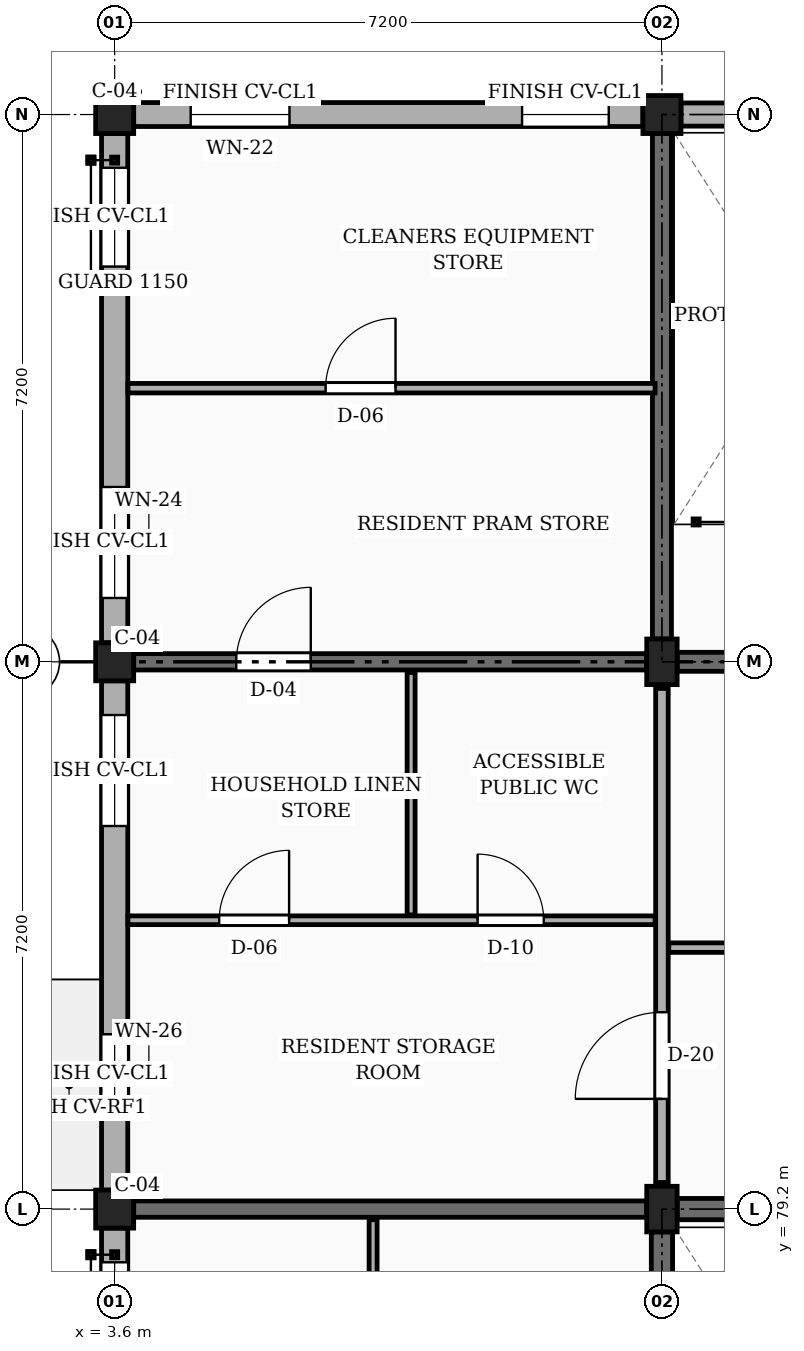
"""IFC4 building model, lengths in metres.
Left out: names, types, materials, properties, quantities, classifications, styles, units other than length and angle.
Written with IfcOpenShell. Run it as: python <this file> out.ifc"""

import sys

from ifc_helpers import new_model, si_unit, direction, frame, frame_2d, origin, origin_2d, place, context, subcontext, project, spatial, rectangle, extrude, element, fill, save


model = new_model("IFC4")
c1 = context("Model", 3, precision=1e-05, world=origin(), true_north=direction((0.0, 1.0)))
c2 = subcontext(c1, "Body", "Model", "MODEL_VIEW")
j1 = project(units=[si_unit("LENGTHUNIT", "METRE"), si_unit("PLANEANGLEUNIT", "RADIAN")], contexts=[c1])
p1 = place(None, origin())
s1 = spatial("IfcSite", under=j1, at=p1, CompositionType="ELEMENT")
p2 = place(p1, origin())
s2 = spatial("IfcBuilding", under=s1, at=p2, CompositionType="ELEMENT")
p3 = place(p2, frame((0.0, 0.0, 26.55)))
s3 = spatial("IfcBuildingStorey", under=s2, at=p3, CompositionType="ELEMENT", Elevation=26.55)
for number, where, z_axis, x_axis in (
    (1, (3.6, 79.2, 0.0), (0.0, 0.0, 1.0), (1.0, 0.0, 0.0)),
    (2, (3.6, 86.4, 0.0), (0.0, 0.0, 1.0), (1.0, 0.0, 0.0)),
    (3, (3.6, 93.6, 0.0), (0.0, 0.0, 1.0), (1.0, 0.0, 0.0)),
):
    element("IfcColumn", number, at=place(p3, frame(where, z_axis=z_axis, x_axis=x_axis)), inside=s3, PredefinedType="COLUMN", context=c2, shape_type="SweptSolid", body=[
        extrude(rectangle(XDim=0.5, YDim=0.5, at=origin_2d()), origin(), (0.0, 0.0, 1.0), 3.15),
    ])
for number, where, z_axis, x_axis in (
    (4, (10.8, 79.2, 0.0), (0.0, 0.0, 1.0), (1.0, 0.0, 0.0)),
    (5, (10.8, 86.4, 0.0), (0.0, 0.0, 1.0), (1.0, 0.0, 0.0)),
):
    element("IfcColumn", number, at=place(p3, frame(where, z_axis=z_axis, x_axis=x_axis)), inside=s3, PredefinedType="COLUMN", context=c2, shape_type="SweptSolid", body=[
        extrude(rectangle(XDim=0.4, YDim=0.6, at=origin_2d()), origin(), (0.0, 0.0, 1.0), 3.15),
    ])
p4 = place(p3, frame((10.8, 93.6, 0.0), z_axis=(0.0, 0.0, 1.0), x_axis=(1.0, 0.0, 0.0)))
e6 = element("IfcColumn", 6, at=p4, inside=s3, PredefinedType="COLUMN", context=c2, shape_type="SweptSolid", body=[
    extrude(rectangle(XDim=0.5, YDim=0.5, at=origin_2d()), origin(), (0.0, 0.0, 1.0), 3.15),
])
p5 = place(p3, frame((3.85, 79.2, 0.0), z_axis=(0.0, 0.0, 1.0), x_axis=(1.0, 0.0, 0.0)))
e7 = element("IfcWall", 7, at=p5, inside=s3, PredefinedType="SOLIDWALL", context=c2, shape_type="SweptSolid", body=[
    extrude(rectangle(XDim=6.75, YDim=0.215, at=frame_2d((3.375, 0.0))), origin(), (0.0, 0.0, 1.0), 2.22),
])
p6 = place(p3, frame((3.85, 86.4, 0.0), z_axis=(0.0, 0.0, 1.0), x_axis=(1.0, 0.0, 0.0)))
e8 = element("IfcWall", 8, at=p6, inside=s3, PredefinedType="SOLIDWALL", context=c2, shape_type="SweptSolid", body=[
    extrude(rectangle(XDim=6.75, YDim=0.215, at=frame_2d((3.375, 0.0))), origin(), (0.0, 0.0, 1.0), 2.22),
])
p7 = place(p6, frame((1.35, 0.0, 0.0)))
e9 = element("IfcOpeningElement", 9, at=p7, cuts=e8, PredefinedType="OPENING", context=c2, shape_type="SweptSolid", body=[
    extrude(rectangle(XDim=0.98, YDim=2.12, at=frame_2d((0.49, 1.06))), frame((0.0, 0.118, 0.0), z_axis=(0.0, -1.0, 0.0), x_axis=(1.0, 0.0, 0.0)), (0.0, 0.0, 1.0), 0.235),
])
p8 = place(p3, frame((17.75, 93.6, 0.0), z_axis=(0.0, 0.0, 1.0), x_axis=(-1.0, 0.0, 0.0)))
e10 = element("IfcWall", 10, at=p8, inside=s3, PredefinedType="SOLIDWALL", context=c2, shape_type="SweptSolid", body=[
    extrude(rectangle(XDim=6.7, YDim=0.305, at=frame_2d((3.35, 0.0))), origin(), (0.0, 0.0, 1.0), 2.46),
])
p9 = place(p8, frame((2.925, 0.0, 0.9)))
e11 = element("IfcOpeningElement", 11, at=p9, cuts=e10, PredefinedType="OPENING", context=c2, shape_type="SweptSolid", body=[
    extrude(rectangle(XDim=0.85, YDim=1.15, at=frame_2d((0.425, 0.575))), frame((0.0, 0.163, 0.0), z_axis=(0.0, -1.0, 0.0), x_axis=(1.0, 0.0, 0.0)), (0.0, 0.0, 1.0), 0.325),
])
p10 = place(p3, frame((10.55, 93.6, 0.0), z_axis=(0.0, 0.0, 1.0), x_axis=(-1.0, 0.0, 0.0)))
e12 = element("IfcWall", 12, at=p10, inside=s3, PredefinedType="SOLIDWALL", context=c2, shape_type="SweptSolid", body=[
    extrude(rectangle(XDim=6.7, YDim=0.315, at=frame_2d((3.35, 0.0))), origin(), (0.0, 0.0, 1.0), 2.46),
])
p11 = place(p10, frame((0.45, 0.0, 0.78)))
e13 = element("IfcOpeningElement", 13, at=p11, cuts=e12, PredefinedType="OPENING", context=c2, shape_type="SweptSolid", body=[
    extrude(rectangle(XDim=1.14, YDim=1.36, at=frame_2d((0.57, 0.68))), frame((0.0, 0.167, 0.0), z_axis=(0.0, -1.0, 0.0), x_axis=(1.0, 0.0, 0.0)), (0.0, 0.0, 1.0), 0.335),
])
p12 = place(p10, frame((4.65, 0.0, 0.78)))
e14 = element("IfcOpeningElement", 14, at=p12, cuts=e12, PredefinedType="OPENING", context=c2, shape_type="SweptSolid", body=[
    extrude(rectangle(XDim=1.3, YDim=1.36, at=frame_2d((0.65, 0.68))), frame((0.0, 0.167, 0.0), z_axis=(0.0, -1.0, 0.0), x_axis=(1.0, 0.0, 0.0)), (0.0, 0.0, 1.0), 0.335),
])
p13 = place(p3, frame((3.6, 93.35, 0.0), z_axis=(0.0, 0.0, 1.0), x_axis=(0.0, -1.0, 0.0)))
e15 = element("IfcWall", 15, at=p13, inside=s3, PredefinedType="SOLIDWALL", context=c2, shape_type="SweptSolid", body=[
    extrude(rectangle(XDim=6.7, YDim=0.345, at=frame_2d((3.35, 0.0))), origin(), (0.0, 0.0, 1.0), 2.46),
])
p14 = place(p13, frame((0.45, 0.0, 0.78)))
e16 = element("IfcOpeningElement", 16, at=p14, cuts=e15, PredefinedType="OPENING", context=c2, shape_type="SweptSolid", body=[
    extrude(rectangle(XDim=1.3, YDim=1.36, at=frame_2d((0.65, 0.68))), frame((0.0, 0.183, 0.0), z_axis=(0.0, -1.0, 0.0), x_axis=(1.0, 0.0, 0.0)), (0.0, 0.0, 1.0), 0.365),
])
p15 = place(p13, frame((4.65, 0.0, 0.78)))
e17 = element("IfcOpeningElement", 17, at=p15, cuts=e15, PredefinedType="OPENING", context=c2, shape_type="SweptSolid", body=[
    extrude(rectangle(XDim=1.46, YDim=1.36, at=frame_2d((0.73, 0.68))), frame((0.0, 0.183, 0.0), z_axis=(0.0, -1.0, 0.0), x_axis=(1.0, 0.0, 0.0)), (0.0, 0.0, 1.0), 0.365),
])
p16 = place(p3, frame((3.6, 86.15, 0.0), z_axis=(0.0, 0.0, 1.0), x_axis=(0.0, -1.0, 0.0)))
e18 = element("IfcWall", 18, at=p16, inside=s3, PredefinedType="SOLIDWALL", context=c2, shape_type="SweptSolid", body=[
    extrude(rectangle(XDim=6.7, YDim=0.345, at=frame_2d((3.35, 0.0))), origin(), (0.0, 0.0, 1.0), 2.46),
])
p17 = place(p16, frame((0.45, 0.0, 0.78)))
e19 = element("IfcOpeningElement", 19, at=p17, cuts=e18, PredefinedType="OPENING", context=c2, shape_type="SweptSolid", body=[
    extrude(rectangle(XDim=1.46, YDim=1.36, at=frame_2d((0.73, 0.68))), frame((0.0, 0.183, 0.0), z_axis=(0.0, -1.0, 0.0), x_axis=(1.0, 0.0, 0.0)), (0.0, 0.0, 1.0), 0.365),
])
p18 = place(p16, frame((4.65, 0.0, 0.78)))
e20 = element("IfcOpeningElement", 20, at=p18, cuts=e18, PredefinedType="OPENING", context=c2, shape_type="SweptSolid", body=[
    extrude(rectangle(XDim=1.05, YDim=1.44, at=frame_2d((0.525, 0.72))), frame((0.0, 0.183, 0.0), z_axis=(0.0, -1.0, 0.0), x_axis=(1.0, 0.0, 0.0)), (0.0, 0.0, 1.0), 0.365),
])
p19 = place(p3, frame((3.6, 78.95, 0.0), z_axis=(0.0, 0.0, 1.0), x_axis=(0.0, -1.0, 0.0)))
e21 = element("IfcWall", 21, at=p19, inside=s3, PredefinedType="SOLIDWALL", context=c2, shape_type="SweptSolid", body=[
    extrude(rectangle(XDim=6.7, YDim=0.345, at=frame_2d((3.35, 0.0))), origin(), (0.0, 0.0, 1.0), 2.46),
])
p20 = place(p19, frame((0.45, 0.0, 0.78)))
e22 = element("IfcOpeningElement", 22, at=p20, cuts=e21, PredefinedType="OPENING", context=c2, shape_type="SweptSolid", body=[
    extrude(rectangle(XDim=1.05, YDim=1.44, at=frame_2d((0.525, 0.72))), frame((0.0, 0.183, 0.0), z_axis=(0.0, -1.0, 0.0), x_axis=(1.0, 0.0, 0.0)), (0.0, 0.0, 1.0), 0.365),
])
p21 = place(p19, frame((4.65, 0.0, 0.78)))
e23 = element("IfcOpeningElement", 23, at=p21, cuts=e21, PredefinedType="OPENING", context=c2, shape_type="SweptSolid", body=[
    extrude(rectangle(XDim=1.25, YDim=1.44, at=frame_2d((0.625, 0.72))), frame((0.0, 0.183, 0.0), z_axis=(0.0, -1.0, 0.0), x_axis=(1.0, 0.0, 0.0)), (0.0, 0.0, 1.0), 0.365),
])
p22 = place(p3, frame((10.8, 72.3, 0.0), z_axis=(0.0, 0.0, 1.0), x_axis=(0.0, 1.0, 0.0)))
e24 = element("IfcWall", 24, at=p22, inside=s3, PredefinedType="SHEAR", context=c2, shape_type="SweptSolid", body=[
    extrude(rectangle(XDim=6.6, YDim=0.28, at=frame_2d((3.3, 0.0))), origin(), (0.0, 0.0, 1.0), 2.89),
])
p23 = place(p3, frame((11.0, 79.2, 0.0), z_axis=(0.0, 0.0, 1.0), x_axis=(1.0, 0.0, 0.0)))
e25 = element("IfcWall", 25, at=p23, inside=s3, PredefinedType="SHEAR", context=c2, shape_type="SweptSolid", body=[
    extrude(rectangle(XDim=6.8, YDim=0.28, at=frame_2d((3.4, 0.0))), origin(), (0.0, 0.0, 1.0), 2.89),
])
p24 = place(p3, frame((10.8, 86.7, 0.0), z_axis=(0.0, 0.0, 1.0), x_axis=(0.0, 1.0, 0.0)))
e26 = element("IfcWall", 26, at=p24, inside=s3, PredefinedType="SHEAR", context=c2, shape_type="SweptSolid", body=[
    extrude(rectangle(XDim=6.65, YDim=0.25, at=frame_2d((3.325, 0.0))), origin(), (0.0, 0.0, 1.0), 2.89),
])
p25 = place(p3, frame((11.0, 86.4, 0.0), z_axis=(0.0, 0.0, 1.0), x_axis=(1.0, 0.0, 0.0)))
e27 = element("IfcWall", 27, at=p25, inside=s3, PredefinedType="SHEAR", context=c2, shape_type="SweptSolid", body=[
    extrude(rectangle(XDim=6.8, YDim=0.25, at=frame_2d((3.4, 0.0))), origin(), (0.0, 0.0, 1.0), 2.89),
])
p26 = place(p3, frame((10.8, 79.55, 0.0), z_axis=(0.0, 0.0, 1.0), x_axis=(0.0, 1.0, 0.0)))
e28 = element("IfcWall", 28, at=p26, inside=s3, PredefinedType="PARTITIONING", context=c2, shape_type="SweptSolid", body=[
    extrude(rectangle(XDim=6.5, YDim=0.165, at=frame_2d((3.25, 0.0))), origin(), (0.0, 0.0, 1.0), 2.325),
])
p27 = place(p26, frame((1.1, 0.0, 0.0)))
e29 = element("IfcOpeningElement", 29, at=p27, cuts=e28, PredefinedType="OPENING", context=c2, shape_type="SweptSolid", body=[
    extrude(rectangle(XDim=1.14, YDim=2.18, at=frame_2d((0.57, 1.09))), frame((0.0, 0.093, 0.0), z_axis=(0.0, -1.0, 0.0), x_axis=(1.0, 0.0, 0.0)), (0.0, 0.0, 1.0), 0.185),
])
p28 = place(p3, frame((7.0, 75.37, 0.0), z_axis=(0.0, 0.0, 1.0), x_axis=(0.0, 1.0, 0.0)))
e30 = element("IfcWall", 30, at=p28, inside=s3, PredefinedType="PARTITIONING", context=c2, shape_type="SweptSolid", body=[
    extrude(rectangle(XDim=3.69, YDim=0.105, at=frame_2d((1.845, 0.0))), origin(), (0.0, 0.0, 1.0), 2.325),
])
p29 = place(p3, frame((10.89, 82.64, 0.0), z_axis=(0.0, 0.0, 1.0), x_axis=(1.0, 0.0, 0.0)))
e31 = element("IfcWall", 31, at=p29, inside=s3, PredefinedType="PARTITIONING", context=c2, shape_type="SweptSolid", body=[
    extrude(rectangle(XDim=7.02, YDim=0.125, at=frame_2d((3.51, 0.0))), origin(), (0.0, 0.0, 1.0), 2.325),
])
p30 = place(p29, frame((2.85, 0.0, 0.0)))
e32 = element("IfcOpeningElement", 32, at=p30, cuts=e31, PredefinedType="OPENING", context=c2, shape_type="SweptSolid", body=[
    extrude(rectangle(XDim=1.02, YDim=2.15, at=frame_2d((0.51, 1.075))), frame((0.0, 0.073, 0.0), z_axis=(0.0, -1.0, 0.0), x_axis=(1.0, 0.0, 0.0)), (0.0, 0.0, 1.0), 0.145),
])
p31 = place(p3, frame((3.775, 83.0, 0.0), z_axis=(0.0, 0.0, 1.0), x_axis=(1.0, 0.0, 0.0)))
e33 = element("IfcWall", 33, at=p31, inside=s3, PredefinedType="PARTITIONING", context=c2, shape_type="SweptSolid", body=[
    extrude(rectangle(XDim=6.935, YDim=0.115, at=frame_2d((3.468, 0.0))), origin(), (0.0, 0.0, 1.0), 2.325),
])
p32 = place(p31, frame((4.6, 0.0, 0.0)))
e34 = element("IfcOpeningElement", 34, at=p32, cuts=e33, PredefinedType="OPENING", context=c2, shape_type="SweptSolid", body=[
    extrude(rectangle(XDim=0.87, YDim=2.05, at=frame_2d((0.435, 1.025))), frame((0.0, 0.067, 0.0), z_axis=(0.0, -1.0, 0.0), x_axis=(1.0, 0.0, 0.0)), (0.0, 0.0, 1.0), 0.135),
])
p33 = place(p31, frame((1.2, 0.0, 0.0)))
e35 = element("IfcOpeningElement", 35, at=p33, cuts=e33, PredefinedType="OPENING", context=c2, shape_type="SweptSolid", body=[
    extrude(rectangle(XDim=0.92, YDim=2.1, at=frame_2d((0.46, 1.05))), frame((0.0, 0.067, 0.0), z_axis=(0.0, -1.0, 0.0), x_axis=(1.0, 0.0, 0.0)), (0.0, 0.0, 1.0), 0.135),
])
p34 = place(p3, frame((7.5, 83.07, 0.0), z_axis=(0.0, 0.0, 1.0), x_axis=(0.0, 1.0, 0.0)))
e36 = element("IfcWall", 36, at=p34, inside=s3, PredefinedType="PARTITIONING", context=c2, shape_type="SweptSolid", body=[
    extrude(rectangle(XDim=3.19, YDim=0.105, at=frame_2d((1.595, 0.0))), origin(), (0.0, 0.0, 1.0), 2.325),
])
p35 = place(p3, frame((3.775, 90.0, 0.0), z_axis=(0.0, 0.0, 1.0), x_axis=(1.0, 0.0, 0.0)))
e37 = element("IfcWall", 37, at=p35, inside=s3, PredefinedType="PARTITIONING", context=c2, shape_type="SweptSolid", body=[
    extrude(rectangle(XDim=6.935, YDim=0.125, at=frame_2d((3.468, 0.0))), origin(), (0.0, 0.0, 1.0), 2.325),
])
p36 = place(p35, frame((2.6, 0.0, 0.0)))
e38 = element("IfcOpeningElement", 38, at=p36, cuts=e37, PredefinedType="OPENING", context=c2, shape_type="SweptSolid", body=[
    extrude(rectangle(XDim=0.92, YDim=2.1, at=frame_2d((0.46, 1.05))), frame((0.0, 0.073, 0.0), z_axis=(0.0, -1.0, 0.0), x_axis=(1.0, 0.0, 0.0)), (0.0, 0.0, 1.0), 0.145),
])
p37 = place(p11, origin())
e39 = element("IfcWindow", 39, at=p37, inside=s3, PartitioningType="SINGLE_PANEL", PredefinedType="WINDOW", context=c2, shape_type="SweptSolid", body=[
    extrude(rectangle(XDim=1.14, YDim=1.36, at=frame_2d((0.57, 0.68))), frame((0.0, 0.03, 0.0), z_axis=(0.0, -1.0, 0.0), x_axis=(1.0, 0.0, 0.0)), (0.0, 0.0, 1.0), 0.06),
])
fill(e13, e39)
p38 = place(p12, origin())
e40 = element("IfcWindow", 40, at=p38, inside=s3, PartitioningType="SINGLE_PANEL", PredefinedType="WINDOW", context=c2, shape_type="SweptSolid", body=[
    extrude(rectangle(XDim=1.3, YDim=1.36, at=frame_2d((0.65, 0.68))), frame((0.0, 0.03, 0.0), z_axis=(0.0, -1.0, 0.0), x_axis=(1.0, 0.0, 0.0)), (0.0, 0.0, 1.0), 0.06),
])
fill(e14, e40)
p39 = place(p14, origin())
e41 = element("IfcWindow", 41, at=p39, inside=s3, PartitioningType="SINGLE_PANEL", PredefinedType="WINDOW", context=c2, shape_type="SweptSolid", body=[
    extrude(rectangle(XDim=1.3, YDim=1.36, at=frame_2d((0.65, 0.68))), frame((0.0, 0.03, 0.0), z_axis=(0.0, -1.0, 0.0), x_axis=(1.0, 0.0, 0.0)), (0.0, 0.0, 1.0), 0.06),
])
fill(e16, e41)
p40 = place(p15, origin())
e42 = element("IfcWindow", 42, at=p40, inside=s3, PartitioningType="SINGLE_PANEL", PredefinedType="WINDOW", context=c2, shape_type="SweptSolid", body=[
    extrude(rectangle(XDim=1.46, YDim=1.36, at=frame_2d((0.73, 0.68))), frame((0.0, 0.03, 0.0), z_axis=(0.0, -1.0, 0.0), x_axis=(1.0, 0.0, 0.0)), (0.0, 0.0, 1.0), 0.06),
])
fill(e17, e42)
p41 = place(p17, origin())
e43 = element("IfcWindow", 43, at=p41, inside=s3, PartitioningType="SINGLE_PANEL", PredefinedType="WINDOW", context=c2, shape_type="SweptSolid", body=[
    extrude(rectangle(XDim=1.46, YDim=1.36, at=frame_2d((0.73, 0.68))), frame((0.0, 0.03, 0.0), z_axis=(0.0, -1.0, 0.0), x_axis=(1.0, 0.0, 0.0)), (0.0, 0.0, 1.0), 0.06),
])
fill(e19, e43)
p42 = place(p18, origin())
e44 = element("IfcWindow", 44, at=p42, inside=s3, PartitioningType="SINGLE_PANEL", PredefinedType="WINDOW", context=c2, shape_type="SweptSolid", body=[
    extrude(rectangle(XDim=1.05, YDim=1.44, at=frame_2d((0.525, 0.72))), frame((0.0, 0.03, 0.0), z_axis=(0.0, -1.0, 0.0), x_axis=(1.0, 0.0, 0.0)), (0.0, 0.0, 1.0), 0.06),
])
fill(e20, e44)
p43 = place(p20, origin())
e45 = element("IfcWindow", 45, at=p43, inside=s3, PartitioningType="SINGLE_PANEL", PredefinedType="WINDOW", context=c2, shape_type="SweptSolid", body=[
    extrude(rectangle(XDim=1.05, YDim=1.44, at=frame_2d((0.525, 0.72))), frame((0.0, 0.03, 0.0), z_axis=(0.0, -1.0, 0.0), x_axis=(1.0, 0.0, 0.0)), (0.0, 0.0, 1.0), 0.06),
])
fill(e22, e45)
p44 = place(p27, origin())
e46 = element("IfcDoor", 46, at=p44, inside=s3, OperationType="SINGLE_SWING_LEFT", PredefinedType="DOOR", context=c2, shape_type="SweptSolid", body=[
    extrude(rectangle(XDim=1.14, YDim=2.18, at=frame_2d((0.57, 1.09))), frame((0.0, 0.025, 0.0), z_axis=(0.0, -1.0, 0.0), x_axis=(1.0, 0.0, 0.0)), (0.0, 0.0, 1.0), 0.05),
])
fill(e29, e46)
p45 = place(p32, origin())
e47 = element("IfcDoor", 47, at=p45, inside=s3, OperationType="SINGLE_SWING_LEFT", PredefinedType="DOOR", context=c2, shape_type="SweptSolid", body=[
    extrude(rectangle(XDim=0.87, YDim=2.05, at=frame_2d((0.435, 1.025))), frame((0.0, 0.025, 0.0), z_axis=(0.0, -1.0, 0.0), x_axis=(1.0, 0.0, 0.0)), (0.0, 0.0, 1.0), 0.05),
])
fill(e34, e47)
p46 = place(p33, origin())
e48 = element("IfcDoor", 48, at=p46, inside=s3, OperationType="SINGLE_SWING_RIGHT", PredefinedType="DOOR", context=c2, shape_type="SweptSolid", body=[
    extrude(rectangle(XDim=0.92, YDim=2.1, at=frame_2d((0.46, 1.05))), frame((0.0, 0.025, 0.0), z_axis=(0.0, -1.0, 0.0), x_axis=(1.0, 0.0, 0.0)), (0.0, 0.0, 1.0), 0.05),
])
fill(e35, e48)
p47 = place(p36, origin())
e49 = element("IfcDoor", 49, at=p47, inside=s3, OperationType="SINGLE_SWING_RIGHT", PredefinedType="DOOR", context=c2, shape_type="SweptSolid", body=[
    extrude(rectangle(XDim=0.92, YDim=2.1, at=frame_2d((0.46, 1.05))), frame((0.0, 0.025, 0.0), z_axis=(0.0, -1.0, 0.0), x_axis=(1.0, 0.0, 0.0)), (0.0, 0.0, 1.0), 0.05),
])
fill(e38, e49)
p48 = place(p7, origin())
e50 = element("IfcDoor", 50, at=p48, inside=s3, OperationType="SINGLE_SWING_RIGHT", PredefinedType="DOOR", context=c2, shape_type="SweptSolid", body=[
    extrude(rectangle(XDim=0.98, YDim=2.12, at=frame_2d((0.49, 1.06))), frame((0.0, 0.025, 0.0), z_axis=(0.0, -1.0, 0.0), x_axis=(1.0, 0.0, 0.0)), (0.0, 0.0, 1.0), 0.05),
])
fill(e9, e50)
save(model, sys.argv[1])
